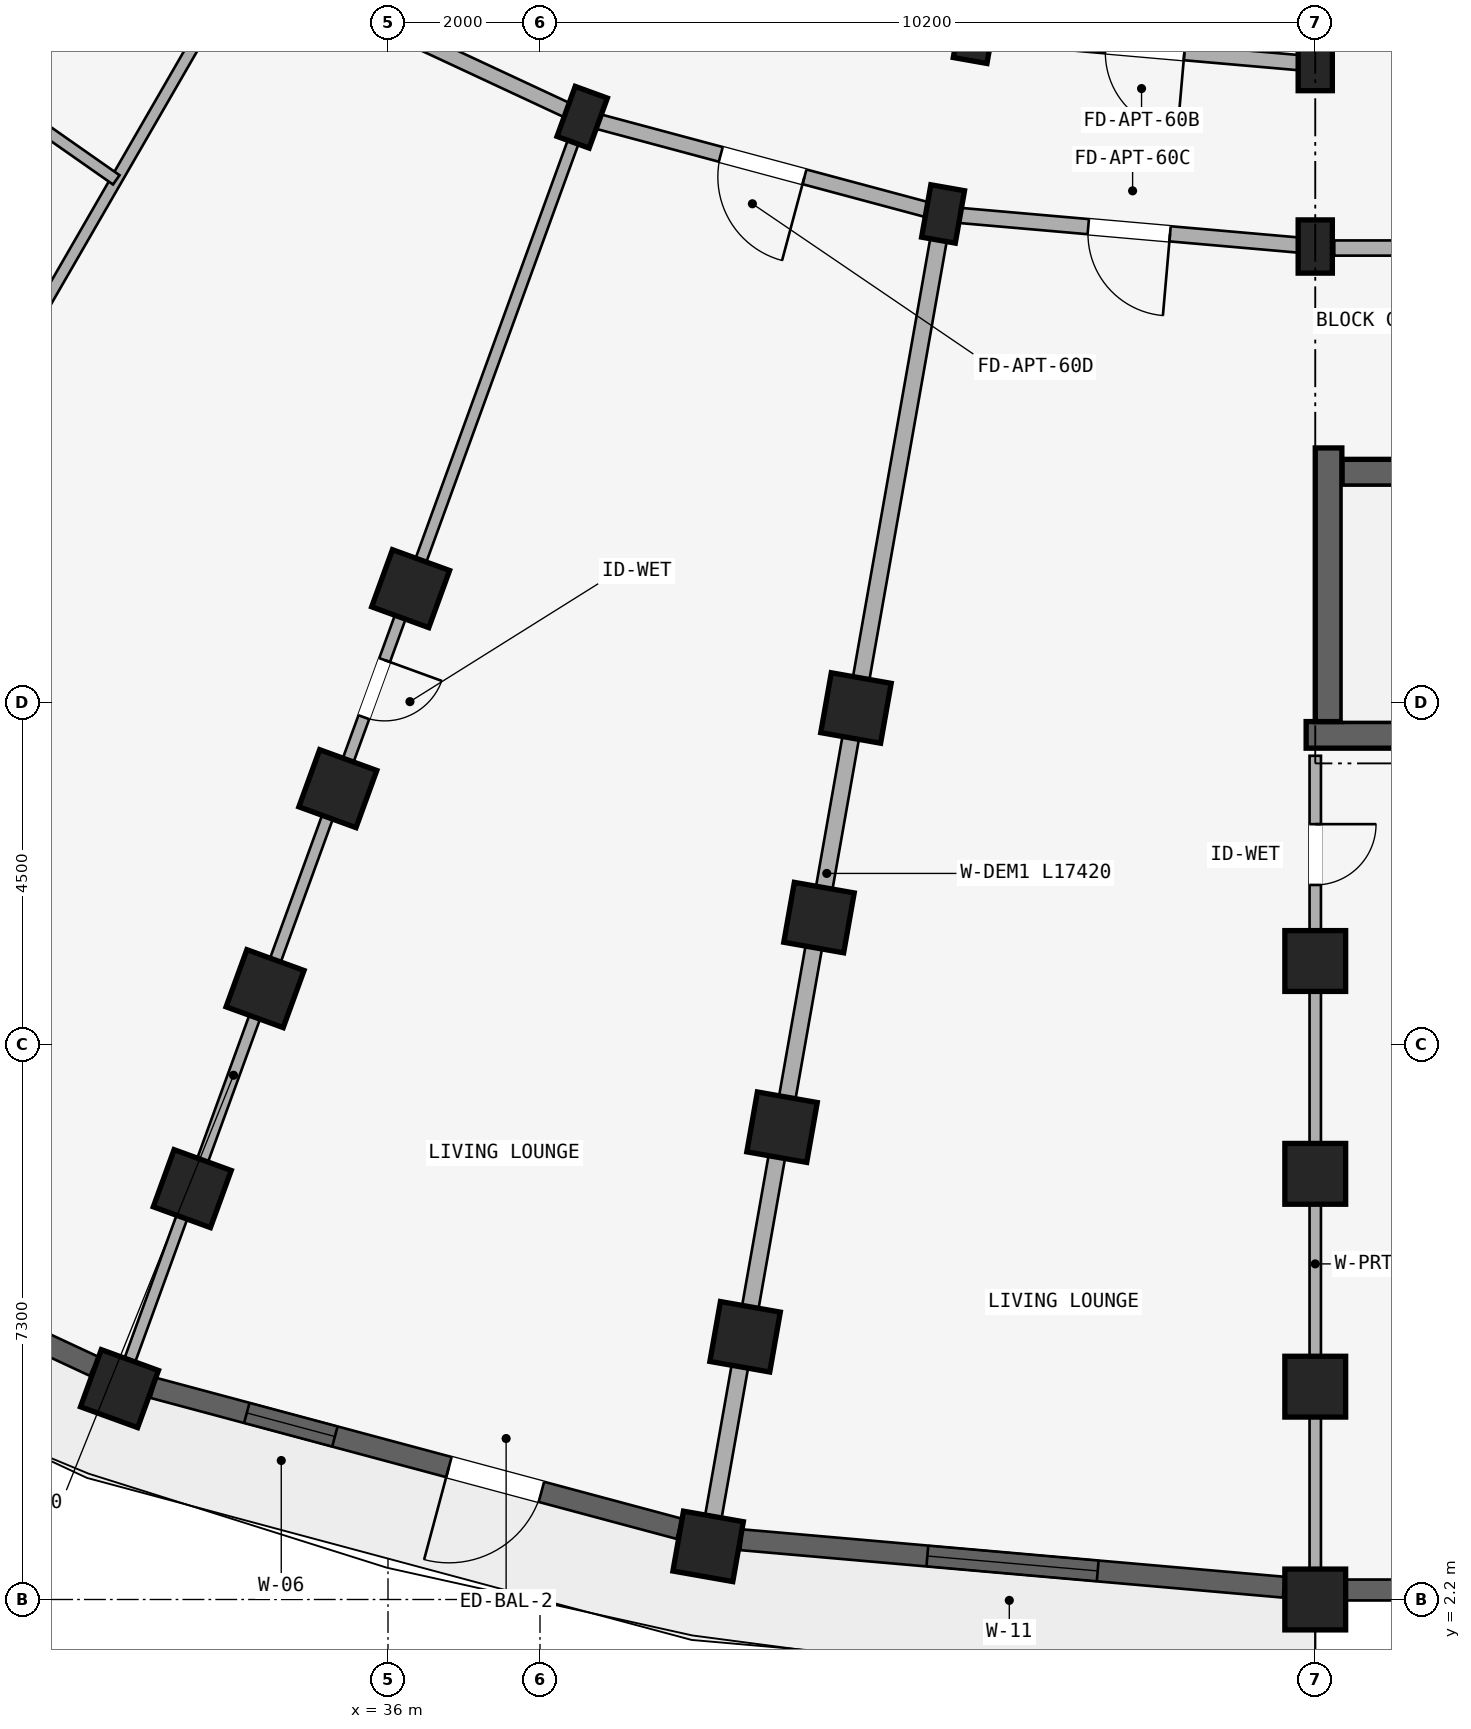
"""IFC4 building model, lengths in metres.
Left out: names, types, materials, properties, quantities, classifications, styles, units other than length and angle.
Written with IfcOpenShell. Run it as: python <this file> out.ifc"""

import sys

from ifc_helpers import new_model, si_unit, direction, frame, frame_2d, origin, origin_2d, place, context, subcontext, project, spatial, rectangle, extrude, element, fill, save


model = new_model("IFC4")
c1 = context("Model", 3, precision=1e-05, world=origin(), true_north=direction((0.0, 1.0)))
c2 = subcontext(c1, "Body", "Model", "MODEL_VIEW")
j1 = project(units=[si_unit("LENGTHUNIT", "METRE"), si_unit("PLANEANGLEUNIT", "RADIAN")], contexts=[c1])
p1 = place(None, origin())
s1 = spatial("IfcSite", under=j1, at=p1, CompositionType="ELEMENT")
p2 = place(p1, origin())
s2 = spatial("IfcBuilding", under=s1, at=p2, CompositionType="ELEMENT")
p3 = place(p2, frame((0.0, 0.0, 15.0)))
s3 = spatial("IfcBuildingStorey", under=s2, at=p3, CompositionType="ELEMENT", Elevation=15.0)
p4 = place(p3, frame((48.08, 13.575, 0.0), z_axis=(0.0, 0.0, 1.0), x_axis=(1.0, 0.0, 0.0)))
e1 = element("IfcWall", 1, at=p4, inside=s3, PredefinedType="SHEAR", context=c2, shape_type="SweptSolid", body=[
    extrude(rectangle(XDim=8.545, YDim=0.35, at=frame_2d((4.272, 0.0))), origin(), (0.0, 0.0, 1.0), 2.93),
])
p5 = place(p3, frame((48.55, 17.025, 0.0), z_axis=(0.0, 0.0, 1.0), x_axis=(1.0, 0.0, 0.0)))
e2 = element("IfcWall", 2, at=p5, inside=s3, PredefinedType="SHEAR", context=c2, shape_type="SweptSolid", body=[
    extrude(rectangle(XDim=8.075, YDim=0.35, at=frame_2d((4.038, 0.0))), origin(), (0.0, 0.0, 1.0), 2.93),
])
p6 = place(p5, frame((6.38, 0.0, 0.0)))
e3 = element("IfcOpeningElement", 3, at=p6, cuts=e2, PredefinedType="OPENING", context=c2, shape_type="SweptSolid", body=[
    extrude(rectangle(XDim=1.24, YDim=2.15, at=frame_2d((0.62, 1.075))), frame((0.0, 0.185, 0.0), z_axis=(0.0, -1.0, 0.0), x_axis=(1.0, 0.0, 0.0)), (0.0, 0.0, 1.0), 0.37),
])
p7 = place(p3, frame((48.375, 17.35, 0.0), z_axis=(0.0, 0.0, 1.0), x_axis=(0.0, -1.0, 0.0)))
e4 = element("IfcWall", 4, at=p7, inside=s3, PredefinedType="SHEAR", context=c2, shape_type="SweptSolid", body=[
    extrude(rectangle(XDim=3.6, YDim=0.35, at=frame_2d((1.8, 0.0))), origin(), (0.0, 0.0, 1.0), 2.93),
])
for number, where, z_axis, x_axis in (
    (5, (48.2, 22.4, 0.0), (0.0, 0.0, 1.0), (1.0, 0.0, 0.0)),
    (6, (48.2, 20.0, 0.0), (0.0, 0.0, 1.0), (1.0, 0.0, 0.0)),
):
    element("IfcColumn", number, at=place(p3, frame(where, z_axis=z_axis, x_axis=x_axis)), inside=s3, PredefinedType="COLUMN", context=c2, shape_type="SweptSolid", body=[
        extrude(rectangle(XDim=0.45, YDim=0.7, at=origin_2d()), origin(), (0.0, 0.0, 1.0), 2.93),
    ])
for number, where, z_axis, x_axis in (
    (7, (48.2, 10.6, 0.0), (0.0, 0.0, 1.0), (1.0, 0.0, 0.0)),
    (8, (48.2, 7.8, 0.0), (0.0, 0.0, 1.0), (1.0, 0.0, 0.0)),
    (9, (48.2, 5.0, 0.0), (0.0, 0.0, 1.0), (1.0, 0.0, 0.0)),
    (10, (48.2, 2.2, 0.0), (0.0, 0.0, 1.0), (1.0, 0.0, 0.0)),
):
    element("IfcColumn", number, at=place(p3, frame(where, z_axis=z_axis, x_axis=x_axis)), inside=s3, PredefinedType="COLUMN", context=c2, shape_type="SweptSolid", body=[
        extrude(rectangle(XDim=0.8, YDim=0.8, at=origin_2d()), origin(), (0.0, 0.0, 1.0), 2.93),
    ])
for number, where, z_axis, x_axis in (
    (11, (43.72, 22.792, 0.0), (0.0, 0.0, 1.0), (-0.985, 0.174, 0.0)),
    (12, (43.303, 20.428, 0.0), (0.0, 0.0, 1.0), (-0.985, 0.174, 0.0)),
):
    element("IfcColumn", number, at=place(p3, frame(where, z_axis=z_axis, x_axis=x_axis)), inside=s3, PredefinedType="COLUMN", context=c2, shape_type="SweptSolid", body=[
        extrude(rectangle(XDim=0.45, YDim=0.7, at=origin_2d()), origin(), (0.0, 0.0, 1.0), 2.93),
    ])
for number, where, z_axis, x_axis in (
    (13, (42.157, 13.929, 0.0), (0.0, 0.0, 1.0), (-0.985, 0.174, 0.0)),
    (14, (41.671, 11.171, 0.0), (0.0, 0.0, 1.0), (-0.985, 0.174, 0.0)),
    (15, (41.185, 8.414, 0.0), (0.0, 0.0, 1.0), (-0.985, 0.174, 0.0)),
    (16, (40.698, 5.656, 0.0), (0.0, 0.0, 1.0), (-0.985, 0.174, 0.0)),
    (17, (40.212, 2.899, 0.0), (0.0, 0.0, 1.0), (-0.985, 0.174, 0.0)),
):
    element("IfcColumn", number, at=place(p3, frame(where, z_axis=z_axis, x_axis=x_axis)), inside=s3, PredefinedType="COLUMN", context=c2, shape_type="SweptSolid", body=[
        extrude(rectangle(XDim=0.8, YDim=0.8, at=origin_2d()), origin(), (0.0, 0.0, 1.0), 2.93),
    ])
p8 = place(p3, frame((38.555, 21.701, 0.0), z_axis=(0.0, 0.0, 1.0), x_axis=(-0.939692620786, 0.342020143326, 0.0)))
e18 = element("IfcColumn", 18, at=p8, inside=s3, PredefinedType="COLUMN", context=c2, shape_type="SweptSolid", body=[
    extrude(rectangle(XDim=0.45, YDim=0.7, at=origin_2d()), origin(), (0.0, 0.0, 1.0), 2.93),
])
for number, where, z_axis, x_axis in (
    (19, (36.298, 15.499, 0.0), (0.0, 0.0, 1.0), (-0.94, 0.342, 0.0)),
    (20, (35.34, 12.868, 0.0), (0.0, 0.0, 1.0), (-0.94, 0.342, 0.0)),
    (21, (34.382, 10.236, 0.0), (0.0, 0.0, 1.0), (-0.94, 0.342, 0.0)),
    (22, (33.425, 7.605, 0.0), (0.0, 0.0, 1.0), (-0.94, 0.342, 0.0)),
    (23, (32.467, 4.974, 0.0), (0.0, 0.0, 1.0), (-0.94, 0.342, 0.0)),
):
    element("IfcColumn", number, at=place(p3, frame(where, z_axis=z_axis, x_axis=x_axis)), inside=s3, PredefinedType="COLUMN", context=c2, shape_type="SweptSolid", body=[
        extrude(rectangle(XDim=0.8, YDim=0.8, at=origin_2d()), origin(), (0.0, 0.0, 1.0), 2.93),
    ])
p9 = place(p3, frame((48.45, 19.98, 0.0), z_axis=(0.0, 0.0, 1.0), x_axis=(1.0, 0.0, 0.0)))
e24 = element("IfcWall", 24, at=p9, inside=s3, PredefinedType="STANDARD", context=c2, shape_type="SweptSolid", body=[
    extrude(rectangle(XDim=5.25, YDim=0.2, at=frame_2d((2.625, 0.0))), origin(), (0.0, 0.0, 1.0), 2.372),
])
p10 = place(p9, frame((2.165, 0.0, 0.0)))
e25 = element("IfcOpeningElement", 25, at=p10, cuts=e24, PredefinedType="OPENING", context=c2, shape_type="SweptSolid", body=[
    extrude(rectangle(XDim=0.92, YDim=2.1, at=frame_2d((0.46, 1.05))), frame((0.0, 0.11, 0.0), z_axis=(0.0, -1.0, 0.0), x_axis=(1.0, 0.0, 0.0)), (0.0, 0.0, 1.0), 0.22),
])
p11 = place(p3, frame((48.2, 22.4, 0.0), z_axis=(0.0, 0.0, 1.0), x_axis=(-0.996191949488, 0.087187153726, 0.0)))
e26 = element("IfcWall", 26, at=p11, inside=s3, PredefinedType="STANDARD", context=c2, shape_type="SweptSolid", body=[
    extrude(rectangle(XDim=4.497, YDim=0.2, at=frame_2d((2.249, 0.0))), origin(), (0.0, 0.0, 1.0), 2.372),
])
p12 = place(p11, frame((1.729, 0.0, 0.0)))
e27 = element("IfcOpeningElement", 27, at=p12, cuts=e26, PredefinedType="OPENING", context=c2, shape_type="SweptSolid", body=[
    extrude(rectangle(XDim=1.04, YDim=2.15, at=frame_2d((0.52, 1.075))), frame((0.0, 0.11, 0.0), z_axis=(0.0, -1.0, 0.0), x_axis=(1.0, 0.0, 0.0)), (0.0, 0.0, 1.0), 0.22),
])
p13 = place(p3, frame((48.2, 20.0, 0.0), z_axis=(0.0, 0.0, 1.0), x_axis=(-0.996193663584, 0.087167566415, 0.0)))
e28 = element("IfcWall", 28, at=p13, inside=s3, PredefinedType="STANDARD", context=c2, shape_type="SweptSolid", body=[
    extrude(rectangle(XDim=4.916, YDim=0.2, at=frame_2d((2.458, 0.0))), origin(), (0.0, 0.0, 1.0), 2.372),
])
p14 = place(p13, frame((1.918, 0.0, 0.0)))
e29 = element("IfcOpeningElement", 29, at=p14, cuts=e28, PredefinedType="OPENING", context=c2, shape_type="SweptSolid", body=[
    extrude(rectangle(XDim=1.08, YDim=2.15, at=frame_2d((0.54, 1.075))), frame((0.0, 0.11, 0.0), z_axis=(0.0, -1.0, 0.0), x_axis=(1.0, 0.0, 0.0)), (0.0, 0.0, 1.0), 0.22),
])
p15 = place(p3, frame((43.303, 20.428, 0.0), z_axis=(0.0, 0.0, 1.0), x_axis=(-0.965930095386, 0.258803112091, 0.0)))
e30 = element("IfcWall", 30, at=p15, inside=s3, PredefinedType="STANDARD", context=c2, shape_type="SweptSolid", body=[
    extrude(rectangle(XDim=4.916, YDim=0.2, at=frame_2d((2.458, 0.0))), origin(), (0.0, 0.0, 1.0), 2.372),
])
p16 = place(p15, frame((1.888, 0.0, 0.0)))
e31 = element("IfcOpeningElement", 31, at=p16, cuts=e30, PredefinedType="OPENING", context=c2, shape_type="SweptSolid", body=[
    extrude(rectangle(XDim=1.14, YDim=2.15, at=frame_2d((0.57, 1.075))), frame((0.0, 0.11, 0.0), z_axis=(0.0, -1.0, 0.0), x_axis=(1.0, 0.0, 0.0)), (0.0, 0.0, 1.0), 0.22),
])
p17 = place(p3, frame((38.555, 21.701, 0.0), z_axis=(0.0, 0.0, 1.0), x_axis=(-0.906302381024, 0.422629854778, 0.0)))
e32 = element("IfcWall", 32, at=p17, inside=s3, PredefinedType="STANDARD", context=c2, shape_type="SweptSolid", body=[
    extrude(rectangle(XDim=4.915, YDim=0.2, at=frame_2d((2.458, 0.0))), origin(), (0.0, 0.0, 1.0), 2.372),
])
p18 = place(p3, frame((48.2, 25.65, 0.0), z_axis=(0.0, 0.0, 1.0), x_axis=(0.0, -1.0, 0.0)))
e33 = element("IfcWall", 33, at=p18, inside=s3, PredefinedType="STANDARD", context=c2, shape_type="SweptSolid", body=[
    extrude(rectangle(XDim=3.2, YDim=0.22, at=frame_2d((1.6, 0.0))), origin(), (0.0, 0.0, 1.0), 2.372),
])
p19 = place(p3, frame((48.2, 13.3, 0.0), z_axis=(0.0, 0.0, 1.0), x_axis=(0.0, -1.0, 0.0)))
e34 = element("IfcWall", 34, at=p19, inside=s3, PredefinedType="PARTITIONING", context=c2, shape_type="SweptSolid", body=[
    extrude(rectangle(XDim=10.82, YDim=0.15, at=frame_2d((5.41, 0.0))), origin(), (0.0, 0.0, 1.0), 2.372),
])
p20 = place(p19, frame((0.899, 0.0, 0.0)))
e35 = element("IfcOpeningElement", 35, at=p20, cuts=e34, PredefinedType="OPENING", context=c2, shape_type="SweptSolid", body=[
    extrude(rectangle(XDim=0.8, YDim=2.1, at=frame_2d((0.4, 1.05))), frame((0.0, 0.085, 0.0), z_axis=(0.0, -1.0, 0.0), x_axis=(1.0, 0.0, 0.0)), (0.0, 0.0, 1.0), 0.17),
])
p21 = place(p3, frame((43.286, 20.33, 0.0), z_axis=(0.0, 0.0, 1.0), x_axis=(-0.173646216546, -0.984808098809, 0.0)))
e36 = element("IfcWall", 36, at=p21, inside=s3, PredefinedType="STANDARD", context=c2, shape_type="SweptSolid", body=[
    extrude(rectangle(XDim=17.42, YDim=0.22, at=frame_2d((8.71, 0.0))), origin(), (0.0, 0.0, 1.0), 2.372),
])
p22 = place(p3, frame((38.521, 21.607, 0.0), z_axis=(0.0, 0.0, 1.0), x_axis=(-0.342022120477, -0.939691901159, 0.0)))
e37 = element("IfcWall", 37, at=p22, inside=s3, PredefinedType="PARTITIONING", context=c2, shape_type="SweptSolid", body=[
    extrude(rectangle(XDim=17.42, YDim=0.15, at=frame_2d((8.71, 0.0))), origin(), (0.0, 0.0, 1.0), 2.372),
])
p23 = place(p22, frame((7.5, 0.0, 0.0)))
e38 = element("IfcOpeningElement", 38, at=p23, cuts=e37, PredefinedType="OPENING", context=c2, shape_type="SweptSolid", body=[
    extrude(rectangle(XDim=0.8, YDim=2.1, at=frame_2d((0.4, 1.05))), frame((0.0, 0.085, 0.0), z_axis=(0.0, -1.0, 0.0), x_axis=(1.0, 0.0, 0.0)), (0.0, 0.0, 1.0), 0.17),
])
p24 = place(p3, frame((34.05, 23.691, 0.0), z_axis=(0.0, 0.0, 1.0), x_axis=(-0.499997843263, -0.866026648973, 0.0)))
e39 = element("IfcWall", 39, at=p24, inside=s3, PredefinedType="PARTITIONING", context=c2, shape_type="SweptSolid", body=[
    extrude(rectangle(XDim=17.42, YDim=0.15, at=frame_2d((8.71, 0.0))), origin(), (0.0, 0.0, 1.0), 2.372),
])
p25 = place(p24, frame((7.5, 0.0, 0.0)))
e40 = element("IfcOpeningElement", 40, at=p25, cuts=e39, PredefinedType="OPENING", context=c2, shape_type="SweptSolid", body=[
    extrude(rectangle(XDim=0.8, YDim=2.1, at=frame_2d((0.4, 1.05))), frame((0.0, 0.085, 0.0), z_axis=(0.0, -1.0, 0.0), x_axis=(1.0, 0.0, 0.0)), (0.0, 0.0, 1.0), 0.17),
])
p26 = place(p3, frame((32.425, 20.877, 0.0), z_axis=(0.0, 0.0, 1.0), x_axis=(-0.819156831143, 0.573569599955, 0.0)))
e41 = element("IfcWall", 41, at=p26, inside=s3, PredefinedType="PLUMBINGWALL", context=c2, shape_type="SweptSolid", body=[
    extrude(rectangle(XDim=5.5, YDim=0.15, at=frame_2d((2.75, 0.0))), origin(), (0.0, 0.0, 1.0), 2.372),
])
p27 = place(p26, frame((2.33, 0.0, 0.0)))
e42 = element("IfcOpeningElement", 42, at=p27, cuts=e41, PredefinedType="OPENING", context=c2, shape_type="SweptSolid", body=[
    extrude(rectangle(XDim=0.84, YDim=2.1, at=frame_2d((0.42, 1.05))), frame((0.0, 0.085, 0.0), z_axis=(0.0, -1.0, 0.0), x_axis=(1.0, 0.0, 0.0)), (0.0, 0.0, 1.0), 0.17),
])
p28 = place(p3, frame((47.785, 2.362, 0.0), z_axis=(0.0, 0.0, 1.0), x_axis=(-0.99619608453, 0.08713989423, 0.0)))
e43 = element("IfcWall", 43, at=p28, inside=s3, PredefinedType="STANDARD", context=c2, shape_type="SweptSolid", body=[
    extrude(rectangle(XDim=7.164, YDim=0.275, at=frame_2d((3.582, 0.0))), origin(), (0.0, 0.0, 1.0), 2.472),
])
p29 = place(p28, frame((2.457, 0.0, 0.322)))
e44 = element("IfcOpeningElement", 44, at=p29, cuts=e43, PredefinedType="OPENING", context=c2, shape_type="SweptSolid", body=[
    extrude(rectangle(XDim=2.25, YDim=1.95, at=frame_2d((1.125, 0.975))), frame((0.0, 0.147, 0.0), z_axis=(0.0, -1.0, 0.0), x_axis=(1.0, 0.0, 0.0)), (0.0, 0.0, 1.0), 0.295),
])
p30 = place(p3, frame((39.832, 3.13, 0.0), z_axis=(0.0, 0.0, 1.0), x_axis=(-0.965923712619, 0.258826933296, 0.0)))
e45 = element("IfcWall", 45, at=p30, inside=s3, PredefinedType="STANDARD", context=c2, shape_type="SweptSolid", body=[
    extrude(rectangle(XDim=7.164, YDim=0.275, at=frame_2d((3.582, 0.0))), origin(), (0.0, 0.0, 1.0), 2.472),
])
p31 = place(p30, frame((4.69, 0.0, 0.472)))
e46 = element("IfcOpeningElement", 46, at=p31, cuts=e45, PredefinedType="OPENING", context=c2, shape_type="SweptSolid", body=[
    extrude(rectangle(XDim=1.2, YDim=1.5, at=frame_2d((0.6, 0.75))), frame((0.0, 0.147, 0.0), z_axis=(0.0, -1.0, 0.0), x_axis=(1.0, 0.0, 0.0)), (0.0, 0.0, 1.0), 0.295),
])
p32 = place(p30, frame((1.877, 0.0, 0.0)))
e47 = element("IfcOpeningElement", 47, at=p32, cuts=e45, PredefinedType="OPENING", context=c2, shape_type="SweptSolid", body=[
    extrude(rectangle(XDim=1.26, YDim=2.15, at=frame_2d((0.63, 1.075))), frame((0.0, 0.147, 0.0), z_axis=(0.0, -1.0, 0.0), x_axis=(1.0, 0.0, 0.0)), (0.0, 0.0, 1.0), 0.295),
])
p33 = place(p3, frame((32.133, 5.268, 0.0), z_axis=(0.0, 0.0, 1.0), x_axis=(-0.906300636296, 0.422633596215, 0.0)))
e48 = element("IfcWall", 48, at=p33, inside=s3, PredefinedType="STANDARD", context=c2, shape_type="SweptSolid", body=[
    extrude(rectangle(XDim=7.164, YDim=0.275, at=frame_2d((3.582, 0.0))), origin(), (0.0, 0.0, 1.0), 2.472),
])
p34 = place(p33, frame((2.607, 0.0, 0.422)))
e49 = element("IfcOpeningElement", 49, at=p34, cuts=e48, PredefinedType="OPENING", context=c2, shape_type="SweptSolid", body=[
    extrude(rectangle(XDim=1.95, YDim=1.85, at=frame_2d((0.975, 0.925))), frame((0.0, 0.147, 0.0), z_axis=(0.0, -1.0, 0.0), x_axis=(1.0, 0.0, 0.0)), (0.0, 0.0, 1.0), 0.295),
])
p35 = place(p3, frame((48.604, 2.325, 0.0), z_axis=(0.0, 0.0, 1.0), x_axis=(1.0, 0.0, 0.0)))
e50 = element("IfcWall", 50, at=p35, inside=s3, PredefinedType="STANDARD", context=c2, shape_type="SweptSolid", body=[
    extrude(rectangle(XDim=4.793, YDim=0.275, at=frame_2d((2.396, 0.0))), origin(), (0.0, 0.0, 1.0), 2.472),
])
p36 = place(p35, frame((1.796, 0.0, 0.772)))
e51 = element("IfcOpeningElement", 51, at=p36, cuts=e50, PredefinedType="OPENING", context=c2, shape_type="SweptSolid", body=[
    extrude(rectangle(XDim=1.2, YDim=1.5, at=frame_2d((0.6, 0.75))), frame((0.0, 0.147, 0.0), z_axis=(0.0, -1.0, 0.0), x_axis=(1.0, 0.0, 0.0)), (0.0, 0.0, 1.0), 0.295),
])
p37 = place(p29, origin())
e52 = element("IfcWindow", 52, at=p37, inside=s3, PartitioningType="TRIPLE_PANEL_VERTICAL", PredefinedType="WINDOW", context=c2, shape_type="SweptSolid", body=[
    extrude(rectangle(XDim=2.25, YDim=1.95, at=frame_2d((1.125, 0.975))), frame((0.0, 0.03, 0.0), z_axis=(0.0, -1.0, 0.0), x_axis=(1.0, 0.0, 0.0)), (0.0, 0.0, 1.0), 0.06),
])
fill(e44, e52)
p38 = place(p31, origin())
e53 = element("IfcWindow", 53, at=p38, inside=s3, PartitioningType="SINGLE_PANEL", PredefinedType="WINDOW", context=c2, shape_type="SweptSolid", body=[
    extrude(rectangle(XDim=1.2, YDim=1.5, at=frame_2d((0.6, 0.75))), frame((0.0, 0.03, 0.0), z_axis=(0.0, -1.0, 0.0), x_axis=(1.0, 0.0, 0.0)), (0.0, 0.0, 1.0), 0.06),
])
fill(e46, e53)
p39 = place(p20, origin())
e54 = element("IfcDoor", 54, at=p39, inside=s3, OperationType="SINGLE_SWING_LEFT", PredefinedType="DOOR", context=c2, shape_type="SweptSolid", body=[
    extrude(rectangle(XDim=0.8, YDim=2.1, at=frame_2d((0.4, 1.05))), frame((0.0, 0.025, 0.0), z_axis=(0.0, -1.0, 0.0), x_axis=(1.0, 0.0, 0.0)), (0.0, 0.0, 1.0), 0.05),
])
fill(e35, e54)
p40 = place(p23, frame((0.8, 0.0, 0.0), z_axis=(0.0, 0.0, 1.0), x_axis=(-1.0, 0.0, 0.0)))
e55 = element("IfcDoor", 55, at=p40, inside=s3, OperationType="SINGLE_SWING_RIGHT", PredefinedType="DOOR", context=c2, shape_type="SweptSolid", body=[
    extrude(rectangle(XDim=0.8, YDim=2.1, at=frame_2d((0.4, 1.05))), frame((0.0, 0.025, 0.0), z_axis=(0.0, -1.0, 0.0), x_axis=(1.0, 0.0, 0.0)), (0.0, 0.0, 1.0), 0.05),
])
fill(e38, e55)
p41 = place(p14, origin())
e56 = element("IfcDoor", 56, at=p41, inside=s3, OperationType="SINGLE_SWING_LEFT", PredefinedType="DOOR", context=c2, shape_type="SweptSolid", body=[
    extrude(rectangle(XDim=1.08, YDim=2.15, at=frame_2d((0.54, 1.075))), frame((0.0, 0.025, 0.0), z_axis=(0.0, -1.0, 0.0), x_axis=(1.0, 0.0, 0.0)), (0.0, 0.0, 1.0), 0.05),
])
fill(e29, e56)
p42 = place(p16, frame((1.14, 0.0, 0.0), z_axis=(0.0, 0.0, 1.0), x_axis=(-1.0, 0.0, 0.0)))
e57 = element("IfcDoor", 57, at=p42, inside=s3, OperationType="SINGLE_SWING_RIGHT", PredefinedType="DOOR", context=c2, shape_type="SweptSolid", body=[
    extrude(rectangle(XDim=1.14, YDim=2.15, at=frame_2d((0.57, 1.075))), frame((0.0, 0.025, 0.0), z_axis=(0.0, -1.0, 0.0), x_axis=(1.0, 0.0, 0.0)), (0.0, 0.0, 1.0), 0.05),
])
fill(e31, e57)
p43 = place(p12, frame((1.04, 0.0, 0.0), z_axis=(0.0, 0.0, 1.0), x_axis=(-1.0, 0.0, 0.0)))
e58 = element("IfcDoor", 58, at=p43, inside=s3, OperationType="SINGLE_SWING_RIGHT", PredefinedType="DOOR", context=c2, shape_type="SweptSolid", body=[
    extrude(rectangle(XDim=1.04, YDim=2.15, at=frame_2d((0.52, 1.075))), frame((0.0, 0.025, 0.0), z_axis=(0.0, -1.0, 0.0), x_axis=(1.0, 0.0, 0.0)), (0.0, 0.0, 1.0), 0.05),
])
fill(e27, e58)
p44 = place(p32, origin())
e59 = element("IfcDoor", 59, at=p44, inside=s3, OperationType="SINGLE_SWING_RIGHT", PredefinedType="DOOR", context=c2, shape_type="SweptSolid", body=[
    extrude(rectangle(XDim=1.26, YDim=2.15, at=frame_2d((0.63, 1.075))), frame((0.0, 0.025, 0.0), z_axis=(0.0, -1.0, 0.0), x_axis=(1.0, 0.0, 0.0)), (0.0, 0.0, 1.0), 0.05),
])
fill(e47, e59)
save(model, sys.argv[1])
